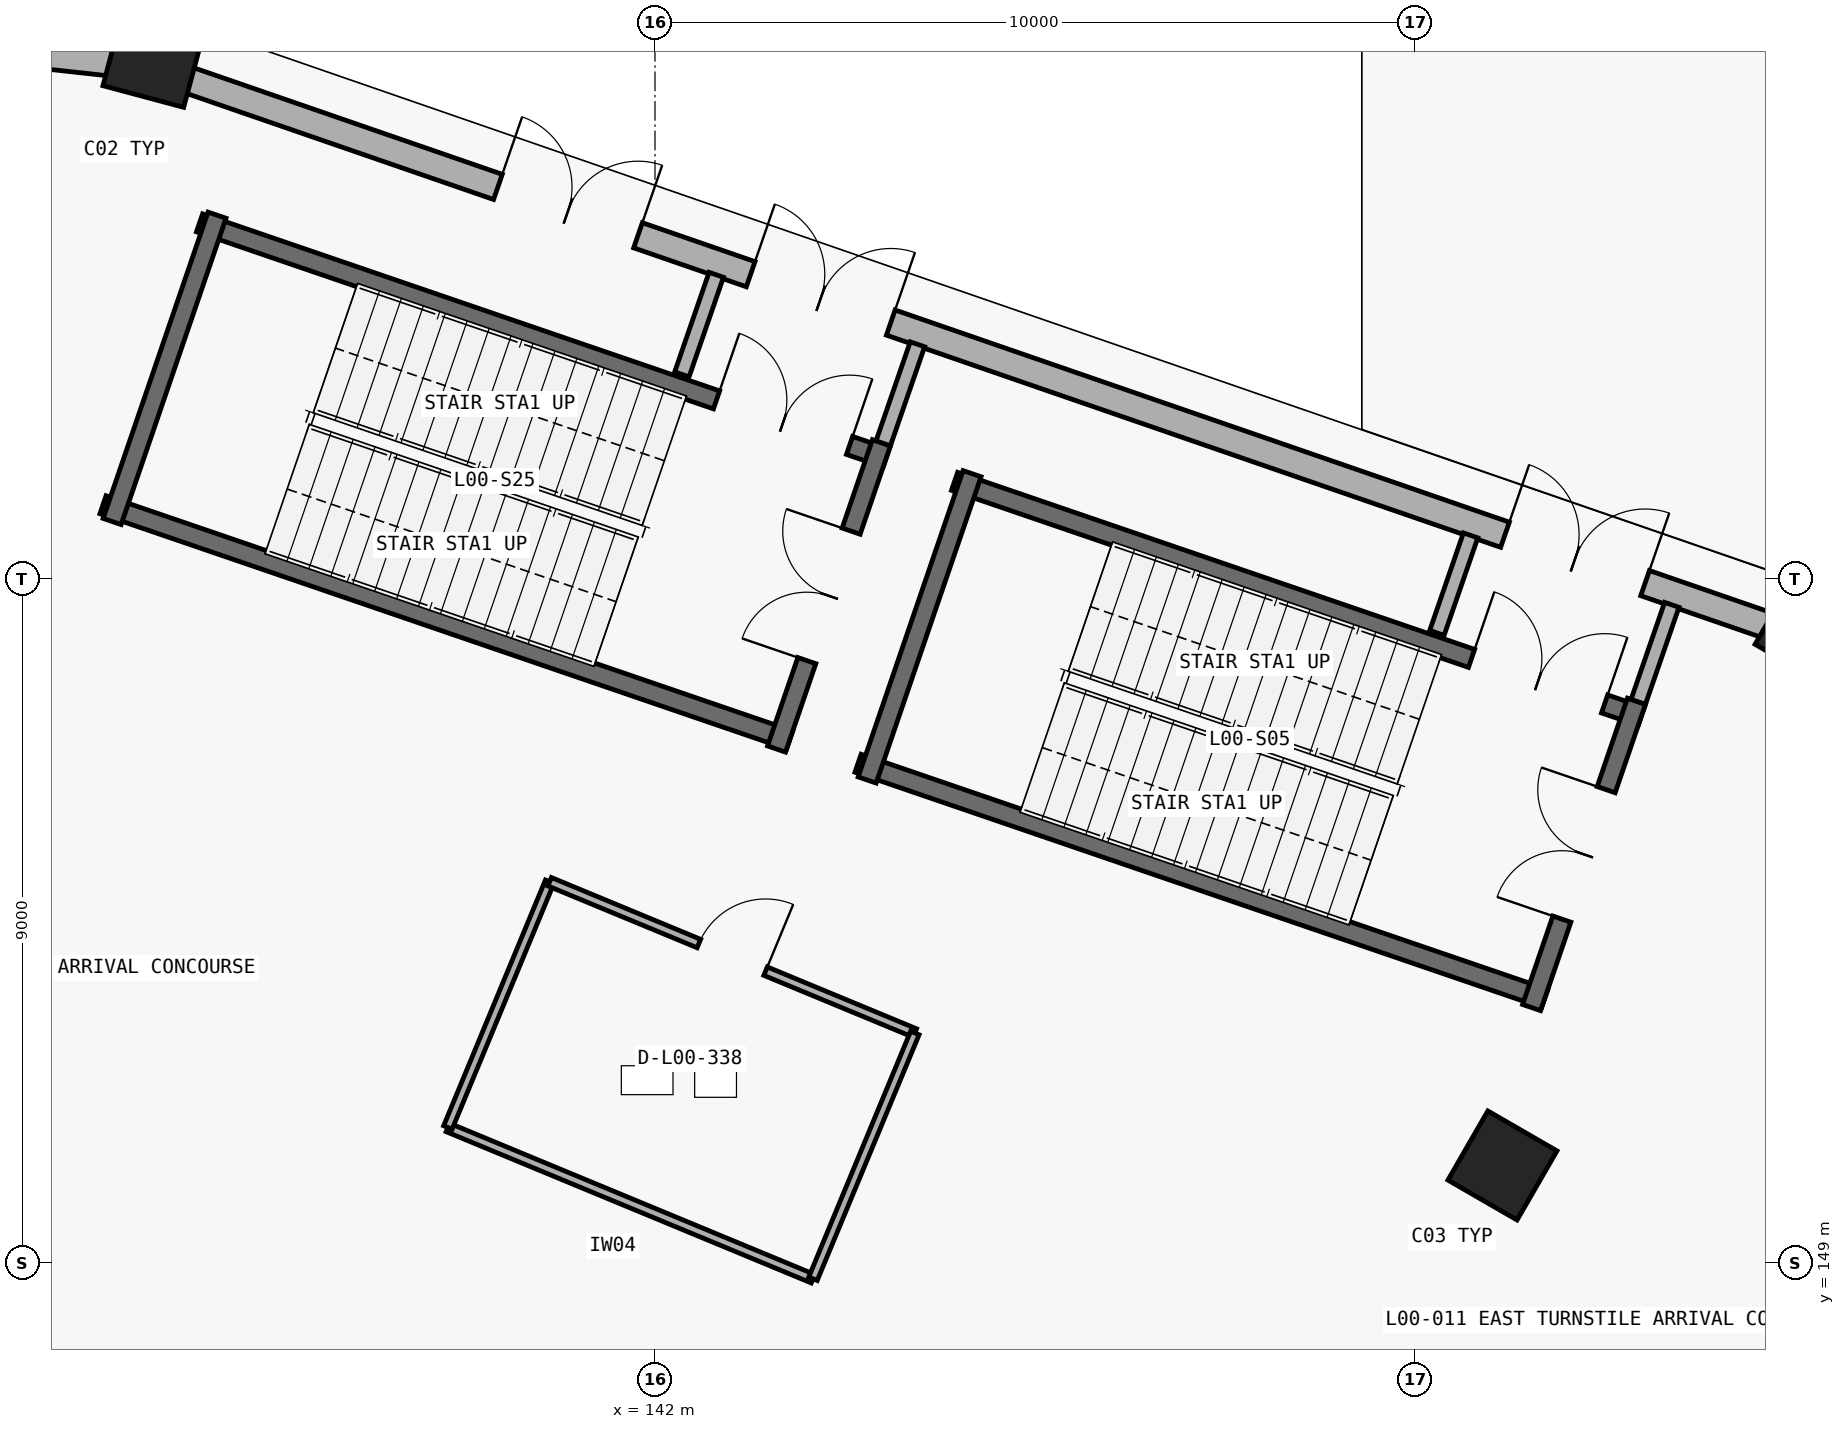
"""IFC4 building model, lengths in metres.
Left out: names, types, materials, properties, quantities, classifications, styles, units other than length and angle.
Written with IfcOpenShell. Run it as: python <this file> out.ifc"""

import sys

from ifc_helpers import new_model, si_unit, direction, frame, frame_2d, origin, origin_2d, place, context, subcontext, project, spatial, rectangle, extrude, element, fill, save


model = new_model("IFC4")
c1 = context("Model", 3, precision=1e-05, world=origin(), true_north=direction((0.0, 1.0)))
c2 = subcontext(c1, "Body", "Model", "MODEL_VIEW")
j1 = project(units=[si_unit("LENGTHUNIT", "METRE"), si_unit("PLANEANGLEUNIT", "RADIAN")], contexts=[c1])
p1 = place(None, origin())
s1 = spatial("IfcSite", under=j1, at=p1, CompositionType="ELEMENT")
p2 = place(p1, origin())
s2 = spatial("IfcBuilding", under=s1, at=p2, CompositionType="ELEMENT")
p3 = place(p2, origin())
s3 = spatial("IfcBuildingStorey", under=s2, at=p3, CompositionType="ELEMENT", Elevation=0.0)
p4 = place(p3, frame((157.15, 157.212, 0.0), z_axis=(0.0, 0.0, 1.0), x_axis=(0.5, 0.866025403784, 0.0)))
e1 = element("IfcColumn", 1, at=p4, inside=s3, PredefinedType="COLUMN", context=c2, shape_type="SweptSolid", body=[
    extrude(rectangle(XDim=0.8, YDim=1.1, at=origin_2d()), origin(), (0.0, 0.0, 1.0), 5.4),
])
p5 = place(p3, frame((153.15, 150.284, 0.0), z_axis=(0.0, 0.0, 1.0), x_axis=(0.5, 0.866025403784, 0.0)))
e2 = element("IfcColumn", 2, at=p5, inside=s3, PredefinedType="COLUMN", context=c2, shape_type="SweptSolid", body=[
    extrude(rectangle(XDim=1.05, YDim=1.05, at=origin_2d()), origin(), (0.0, 0.0, 1.0), 5.4),
])
p6 = place(p3, frame((135.371, 164.734, 0.0), z_axis=(0.0, 0.0, 1.0), x_axis=(0.258819045103, 0.965925826289, 0.0)))
e3 = element("IfcColumn", 3, at=p6, inside=s3, PredefinedType="COLUMN", context=c2, shape_type="SweptSolid", body=[
    extrude(rectangle(XDim=0.8, YDim=1.1, at=origin_2d()), origin(), (0.0, 0.0, 1.0), 5.4),
])
p7 = place(p3, frame((135.869, 164.562, 0.0), z_axis=(0.0, 0.0, 1.0), x_axis=(0.945215757663, -0.326446276538, 0.0)))
e4 = element("IfcWall", 4, at=p7, inside=s3, PredefinedType="STANDARD", context=c2, shape_type="SweptSolid", body=[
    extrude(rectangle(XDim=21.979, YDim=0.35, at=frame_2d((10.99, 0.0))), origin(), (0.0, 0.0, 1.0), 4.165),
])
p8 = place(p7, frame((18.318, 0.0, 0.0)))
e5 = element("IfcOpeningElement", 5, at=p8, cuts=e4, PredefinedType="OPENING", context=c2, shape_type="SweptSolid", body=[
    extrude(rectangle(XDim=1.95, YDim=2.25, at=frame_2d((0.975, 1.125))), frame((0.0, 0.185, 0.0), z_axis=(0.0, -1.0, 0.0), x_axis=(1.0, 0.0, 0.0)), (0.0, 0.0, 1.0), 0.37),
])
p9 = place(p7, frame((7.818, 0.0, 0.0)))
e6 = element("IfcOpeningElement", 6, at=p9, cuts=e4, PredefinedType="OPENING", context=c2, shape_type="SweptSolid", body=[
    extrude(rectangle(XDim=1.95, YDim=2.25, at=frame_2d((0.975, 1.125))), frame((0.0, 0.185, 0.0), z_axis=(0.0, -1.0, 0.0), x_axis=(1.0, 0.0, 0.0)), (0.0, 0.0, 1.0), 0.37),
])
p10 = place(p7, frame((4.3, 0.0, 0.0)))
e7 = element("IfcOpeningElement", 7, at=p10, cuts=e4, PredefinedType="OPENING", context=c2, shape_type="SweptSolid", body=[
    extrude(rectangle(XDim=1.95, YDim=2.25, at=frame_2d((0.975, 1.125))), frame((0.0, 0.185, 0.0), z_axis=(0.0, -1.0, 0.0), x_axis=(1.0, 0.0, 0.0)), (0.0, 0.0, 1.0), 0.37),
])
p11 = place(p3, frame((112.525, 167.242, 0.0), z_axis=(0.0, 0.0, 1.0), x_axis=(0.994028735725, -0.10911861689, 0.0)))
e8 = element("IfcWall", 8, at=p11, inside=s3, PredefinedType="STANDARD", context=c2, shape_type="SweptSolid", body=[
    extrude(rectangle(XDim=22.452, YDim=0.35, at=frame_2d((11.226, 0.0))), origin(), (0.0, 0.0, 1.0), 4.165),
])
p12 = place(p11, frame((18.697, 0.0, 0.0)))
e9 = element("IfcOpeningElement", 9, at=p12, cuts=e8, PredefinedType="OPENING", context=c2, shape_type="SweptSolid", body=[
    extrude(rectangle(XDim=1.95, YDim=2.25, at=frame_2d((0.975, 1.125))), frame((0.0, 0.185, 0.0), z_axis=(0.0, -1.0, 0.0), x_axis=(1.0, 0.0, 0.0)), (0.0, 0.0, 1.0), 0.37),
])
p13 = place(p11, frame((8.197, 0.0, 0.0)))
e10 = element("IfcOpeningElement", 10, at=p13, cuts=e8, PredefinedType="OPENING", context=c2, shape_type="SweptSolid", body=[
    extrude(rectangle(XDim=1.95, YDim=2.25, at=frame_2d((0.975, 1.125))), frame((0.0, 0.185, 0.0), z_axis=(0.0, -1.0, 0.0), x_axis=(1.0, 0.0, 0.0)), (0.0, 0.0, 1.0), 0.37),
])
p14 = place(p11, frame((4.413, 0.0, 0.0)))
e11 = element("IfcOpeningElement", 11, at=p14, cuts=e8, PredefinedType="OPENING", context=c2, shape_type="SweptSolid", body=[
    extrude(rectangle(XDim=1.95, YDim=2.25, at=frame_2d((0.975, 1.125))), frame((0.0, 0.185, 0.0), z_axis=(0.0, -1.0, 0.0), x_axis=(1.0, 0.0, 0.0)), (0.0, 0.0, 1.0), 0.37),
])
p15 = place(p3, frame((145.941, 159.285, 0.0), z_axis=(0.0, 0.0, 1.0), x_axis=(0.946064424228, -0.323978556712, 0.0)))
e12 = element("IfcWall", 12, at=p15, inside=s3, PredefinedType="SHEAR", context=c2, shape_type="SweptSolid", body=[
    extrude(rectangle(XDim=9.55, YDim=0.25, at=frame_2d((4.775, 0.0))), origin(), (0.0, 0.0, 1.0), 5.1),
])
p16 = place(p15, frame((7.19, 0.0, 0.0)))
e13 = element("IfcOpeningElement", 13, at=p16, cuts=e12, PredefinedType="OPENING", context=c2, shape_type="SweptSolid", body=[
    extrude(rectangle(XDim=1.85, YDim=2.3, at=frame_2d((0.925, 1.15))), frame((0.0, 0.135, 0.0), z_axis=(0.0, -1.0, 0.0), x_axis=(1.0, 0.0, 0.0)), (0.0, 0.0, 1.0), 0.27),
])
p17 = place(p3, frame((144.672, 155.576, 0.0), z_axis=(0.0, 0.0, 1.0), x_axis=(0.946064424228, -0.323978556712, 0.0)))
e14 = element("IfcWall", 14, at=p17, inside=s3, PredefinedType="SHEAR", context=c2, shape_type="SweptSolid", body=[
    extrude(rectangle(XDim=9.55, YDim=0.25, at=frame_2d((4.775, 0.0))), origin(), (0.0, 0.0, 1.0), 5.1),
])
p18 = place(p3, frame((153.533, 152.362, 0.0), z_axis=(0.0, 0.0, 1.0), x_axis=(0.323971192516, 0.946066946056, 0.0)))
e15 = element("IfcWall", 15, at=p18, inside=s3, PredefinedType="SHEAR", context=c2, shape_type="SweptSolid", body=[
    extrude(rectangle(XDim=4.26, YDim=0.25, at=frame_2d((2.13, 0.0))), origin(), (0.0, 0.0, 1.0), 5.1),
])
p19 = place(p18, frame((1.23, 0.0, 0.0)))
e16 = element("IfcOpeningElement", 16, at=p19, cuts=e15, PredefinedType="OPENING", context=c2, shape_type="SweptSolid", body=[
    extrude(rectangle(XDim=1.8, YDim=2.25, at=frame_2d((0.9, 1.125))), frame((0.0, 0.135, 0.0), z_axis=(0.0, -1.0, 0.0), x_axis=(1.0, 0.0, 0.0)), (0.0, 0.0, 1.0), 0.27),
])
p20 = place(p3, frame((146.172, 159.385, 0.0), z_axis=(0.0, 0.0, 1.0), x_axis=(-0.323971192516, -0.946066946056, 0.0)))
e17 = element("IfcWall", 17, at=p20, inside=s3, PredefinedType="SHEAR", context=c2, shape_type="SweptSolid", body=[
    extrude(rectangle(XDim=4.26, YDim=0.25, at=frame_2d((2.13, 0.0))), origin(), (0.0, 0.0, 1.0), 5.1),
])
p21 = place(p3, frame((136.008, 162.686, 0.0), z_axis=(0.0, 0.0, 1.0), x_axis=(0.946072259645, -0.323955675256, 0.0)))
e18 = element("IfcWall", 18, at=p21, inside=s3, PredefinedType="SHEAR", context=c2, shape_type="SweptSolid", body=[
    extrude(rectangle(XDim=9.55, YDim=0.25, at=frame_2d((4.775, 0.0))), origin(), (0.0, 0.0, 1.0), 5.1),
])
p22 = place(p21, frame((7.19, 0.0, 0.0)))
e19 = element("IfcOpeningElement", 19, at=p22, cuts=e18, PredefinedType="OPENING", context=c2, shape_type="SweptSolid", body=[
    extrude(rectangle(XDim=1.85, YDim=2.3, at=frame_2d((0.925, 1.15))), frame((0.0, 0.135, 0.0), z_axis=(0.0, -1.0, 0.0), x_axis=(1.0, 0.0, 0.0)), (0.0, 0.0, 1.0), 0.27),
])
p23 = place(p3, frame((134.738, 158.977, 0.0), z_axis=(0.0, 0.0, 1.0), x_axis=(0.946064424228, -0.323978556712, 0.0)))
e20 = element("IfcWall", 20, at=p23, inside=s3, PredefinedType="SHEAR", context=c2, shape_type="SweptSolid", body=[
    extrude(rectangle(XDim=9.55, YDim=0.25, at=frame_2d((4.775, 0.0))), origin(), (0.0, 0.0, 1.0), 5.1),
])
p24 = place(p3, frame((143.599, 155.763, 0.0), z_axis=(0.0, 0.0, 1.0), x_axis=(0.323971192516, 0.946066946056, 0.0)))
e21 = element("IfcWall", 21, at=p24, inside=s3, PredefinedType="SHEAR", context=c2, shape_type="SweptSolid", body=[
    extrude(rectangle(XDim=4.26, YDim=0.25, at=frame_2d((2.13, 0.0))), origin(), (0.0, 0.0, 1.0), 5.1),
])
p25 = place(p24, frame((1.23, 0.0, 0.0)))
e22 = element("IfcOpeningElement", 22, at=p25, cuts=e21, PredefinedType="OPENING", context=c2, shape_type="SweptSolid", body=[
    extrude(rectangle(XDim=1.8, YDim=2.25, at=frame_2d((0.9, 1.125))), frame((0.0, 0.135, 0.0), z_axis=(0.0, -1.0, 0.0), x_axis=(1.0, 0.0, 0.0)), (0.0, 0.0, 1.0), 0.27),
])
p26 = place(p3, frame((136.238, 162.787, 0.0), z_axis=(0.0, 0.0, 1.0), x_axis=(-0.323971192516, -0.946066946056, 0.0)))
e23 = element("IfcWall", 23, at=p26, inside=s3, PredefinedType="SHEAR", context=c2, shape_type="SweptSolid", body=[
    extrude(rectangle(XDim=4.26, YDim=0.25, at=frame_2d((2.13, 0.0))), origin(), (0.0, 0.0, 1.0), 5.1),
])
p27 = place(p3, frame((154.937, 156.384, 0.0), z_axis=(0.0, 0.0, 1.0), x_axis=(0.326626008273, 0.945153665136, 0.0)))
e24 = element("IfcWall", 24, at=p27, inside=s3, PredefinedType="PARTITIONING", context=c2, shape_type="SweptSolid", body=[
    extrude(rectangle(XDim=1.35, YDim=0.2, at=frame_2d((0.675, 0.0))), origin(), (0.0, 0.0, 1.0), 4.165),
])
p28 = place(p3, frame((152.288, 157.291, 0.0), z_axis=(0.0, 0.0, 1.0), x_axis=(0.326461818728, 0.945210389761, 0.0)))
e25 = element("IfcWall", 25, at=p28, inside=s3, PredefinedType="PARTITIONING", context=c2, shape_type="SweptSolid", body=[
    extrude(rectangle(XDim=1.357, YDim=0.2, at=frame_2d((0.679, 0.0))), origin(), (0.0, 0.0, 1.0), 4.165),
])
p29 = place(p3, frame((145.003, 159.785, 0.0), z_axis=(0.0, 0.0, 1.0), x_axis=(0.326410930849, 0.945227964156, 0.0)))
e26 = element("IfcWall", 26, at=p29, inside=s3, PredefinedType="PARTITIONING", context=c2, shape_type="SweptSolid", body=[
    extrude(rectangle(XDim=1.378, YDim=0.2, at=frame_2d((0.689, 0.0))), origin(), (0.0, 0.0, 1.0), 4.165),
])
p30 = place(p3, frame((142.354, 160.692, 0.0), z_axis=(0.0, 0.0, 1.0), x_axis=(0.32614815498, 0.945318666378, 0.0)))
e27 = element("IfcWall", 27, at=p30, inside=s3, PredefinedType="PARTITIONING", context=c2, shape_type="SweptSolid", body=[
    extrude(rectangle(XDim=1.385, YDim=0.2, at=frame_2d((0.693, 0.0))), origin(), (0.0, 0.0, 1.0), 4.165),
])
p31 = place(p3, frame((144.079, 148.794, 0.0), z_axis=(0.0, 0.0, 1.0), x_axis=(-0.923877780955, 0.38268766097, 0.0)))
e28 = element("IfcWall", 28, at=p31, inside=s3, PredefinedType="PARTITIONING", context=c2, shape_type="SweptSolid", body=[
    extrude(rectangle(XDim=5.2, YDim=0.12, at=frame_2d((2.6, 0.0))), origin(), (0.0, 0.0, 1.0), 5.08),
])
p32 = place(p3, frame((139.275, 150.784, 0.0), z_axis=(0.0, 0.0, 1.0), x_axis=(0.38265781443, 0.923890143391, 0.0)))
e29 = element("IfcWall", 29, at=p32, inside=s3, PredefinedType="PARTITIONING", context=c2, shape_type="SweptSolid", body=[
    extrude(rectangle(XDim=3.5, YDim=0.12, at=frame_2d((1.75, 0.0))), origin(), (0.0, 0.0, 1.0), 5.08),
])
p33 = place(p3, frame((140.614, 154.017, 0.0), z_axis=(0.0, 0.0, 1.0), x_axis=(0.923898404293, -0.382637868675, 0.0)))
e30 = element("IfcWall", 30, at=p33, inside=s3, PredefinedType="PARTITIONING", context=c2, shape_type="SweptSolid", body=[
    extrude(rectangle(XDim=5.201, YDim=0.12, at=frame_2d((2.6, 0.0))), origin(), (0.0, 0.0, 1.0), 4.415),
])
p34 = place(p33, frame((2.125, 0.0, 0.0)))
e31 = element("IfcOpeningElement", 31, at=p34, cuts=e30, PredefinedType="OPENING", context=c2, shape_type="SweptSolid", body=[
    extrude(rectangle(XDim=0.95, YDim=2.15, at=frame_2d((0.475, 1.075))), frame((0.0, 0.07, 0.0), z_axis=(0.0, -1.0, 0.0), x_axis=(1.0, 0.0, 0.0)), (0.0, 0.0, 1.0), 0.14),
])
p35 = place(p3, frame((145.419, 152.027, 0.0), z_axis=(0.0, 0.0, 1.0), x_axis=(-0.38283644003, -0.923816139816, 0.0)))
e32 = element("IfcWall", 32, at=p35, inside=s3, PredefinedType="PARTITIONING", context=c2, shape_type="SweptSolid", body=[
    extrude(rectangle(XDim=3.5, YDim=0.12, at=frame_2d((1.75, 0.0))), origin(), (0.0, 0.0, 1.0), 5.08),
])
p36 = place(p8, origin())
e33 = element("IfcDoor", 33, at=p36, inside=s3, OperationType="DOUBLE_DOOR_SINGLE_SWING", PredefinedType="DOOR", context=c2, shape_type="SweptSolid", body=[
    extrude(rectangle(XDim=1.95, YDim=2.25, at=frame_2d((0.975, 1.125))), frame((0.0, 0.025, 0.0), z_axis=(0.0, -1.0, 0.0), x_axis=(1.0, 0.0, 0.0)), (0.0, 0.0, 1.0), 0.05),
])
fill(e5, e33)
p37 = place(p9, origin())
e34 = element("IfcDoor", 34, at=p37, inside=s3, OperationType="DOUBLE_DOOR_SINGLE_SWING", PredefinedType="DOOR", context=c2, shape_type="SweptSolid", body=[
    extrude(rectangle(XDim=1.95, YDim=2.25, at=frame_2d((0.975, 1.125))), frame((0.0, 0.025, 0.0), z_axis=(0.0, -1.0, 0.0), x_axis=(1.0, 0.0, 0.0)), (0.0, 0.0, 1.0), 0.05),
])
fill(e6, e34)
p38 = place(p10, origin())
e35 = element("IfcDoor", 35, at=p38, inside=s3, OperationType="DOUBLE_DOOR_SINGLE_SWING", PredefinedType="DOOR", context=c2, shape_type="SweptSolid", body=[
    extrude(rectangle(XDim=1.95, YDim=2.25, at=frame_2d((0.975, 1.125))), frame((0.0, 0.025, 0.0), z_axis=(0.0, -1.0, 0.0), x_axis=(1.0, 0.0, 0.0)), (0.0, 0.0, 1.0), 0.05),
])
fill(e7, e35)
p39 = place(p19, origin())
e36 = element("IfcDoor", 36, at=p39, inside=s3, OperationType="DOUBLE_DOOR_SINGLE_SWING", PredefinedType="DOOR", context=c2, shape_type="SweptSolid", body=[
    extrude(rectangle(XDim=1.8, YDim=2.25, at=frame_2d((0.9, 1.125))), frame((0.0, 0.025, 0.0), z_axis=(0.0, -1.0, 0.0), x_axis=(1.0, 0.0, 0.0)), (0.0, 0.0, 1.0), 0.05),
])
fill(e16, e36)
p40 = place(p16, origin())
e37 = element("IfcDoor", 37, at=p40, inside=s3, OperationType="DOUBLE_DOOR_SINGLE_SWING", PredefinedType="DOOR", context=c2, shape_type="SweptSolid", body=[
    extrude(rectangle(XDim=1.85, YDim=2.3, at=frame_2d((0.925, 1.15))), frame((0.0, 0.025, 0.0), z_axis=(0.0, -1.0, 0.0), x_axis=(1.0, 0.0, 0.0)), (0.0, 0.0, 1.0), 0.05),
])
fill(e13, e37)
p41 = place(p25, origin())
e38 = element("IfcDoor", 38, at=p41, inside=s3, OperationType="DOUBLE_DOOR_SINGLE_SWING", PredefinedType="DOOR", context=c2, shape_type="SweptSolid", body=[
    extrude(rectangle(XDim=1.8, YDim=2.25, at=frame_2d((0.9, 1.125))), frame((0.0, 0.025, 0.0), z_axis=(0.0, -1.0, 0.0), x_axis=(1.0, 0.0, 0.0)), (0.0, 0.0, 1.0), 0.05),
])
fill(e22, e38)
p42 = place(p22, origin())
e39 = element("IfcDoor", 39, at=p42, inside=s3, OperationType="DOUBLE_DOOR_SINGLE_SWING", PredefinedType="DOOR", context=c2, shape_type="SweptSolid", body=[
    extrude(rectangle(XDim=1.85, YDim=2.3, at=frame_2d((0.925, 1.15))), frame((0.0, 0.025, 0.0), z_axis=(0.0, -1.0, 0.0), x_axis=(1.0, 0.0, 0.0)), (0.0, 0.0, 1.0), 0.05),
])
fill(e19, e39)
p43 = place(p34, origin())
e40 = element("IfcDoor", 40, at=p43, inside=s3, OperationType="SINGLE_SWING_RIGHT", PredefinedType="DOOR", context=c2, shape_type="SweptSolid", body=[
    extrude(rectangle(XDim=0.95, YDim=2.15, at=frame_2d((0.475, 1.075))), frame((0.0, 0.025, 0.0), z_axis=(0.0, -1.0, 0.0), x_axis=(1.0, 0.0, 0.0)), (0.0, 0.0, 1.0), 0.05),
])
fill(e31, e40)
save(model, sys.argv[1])
